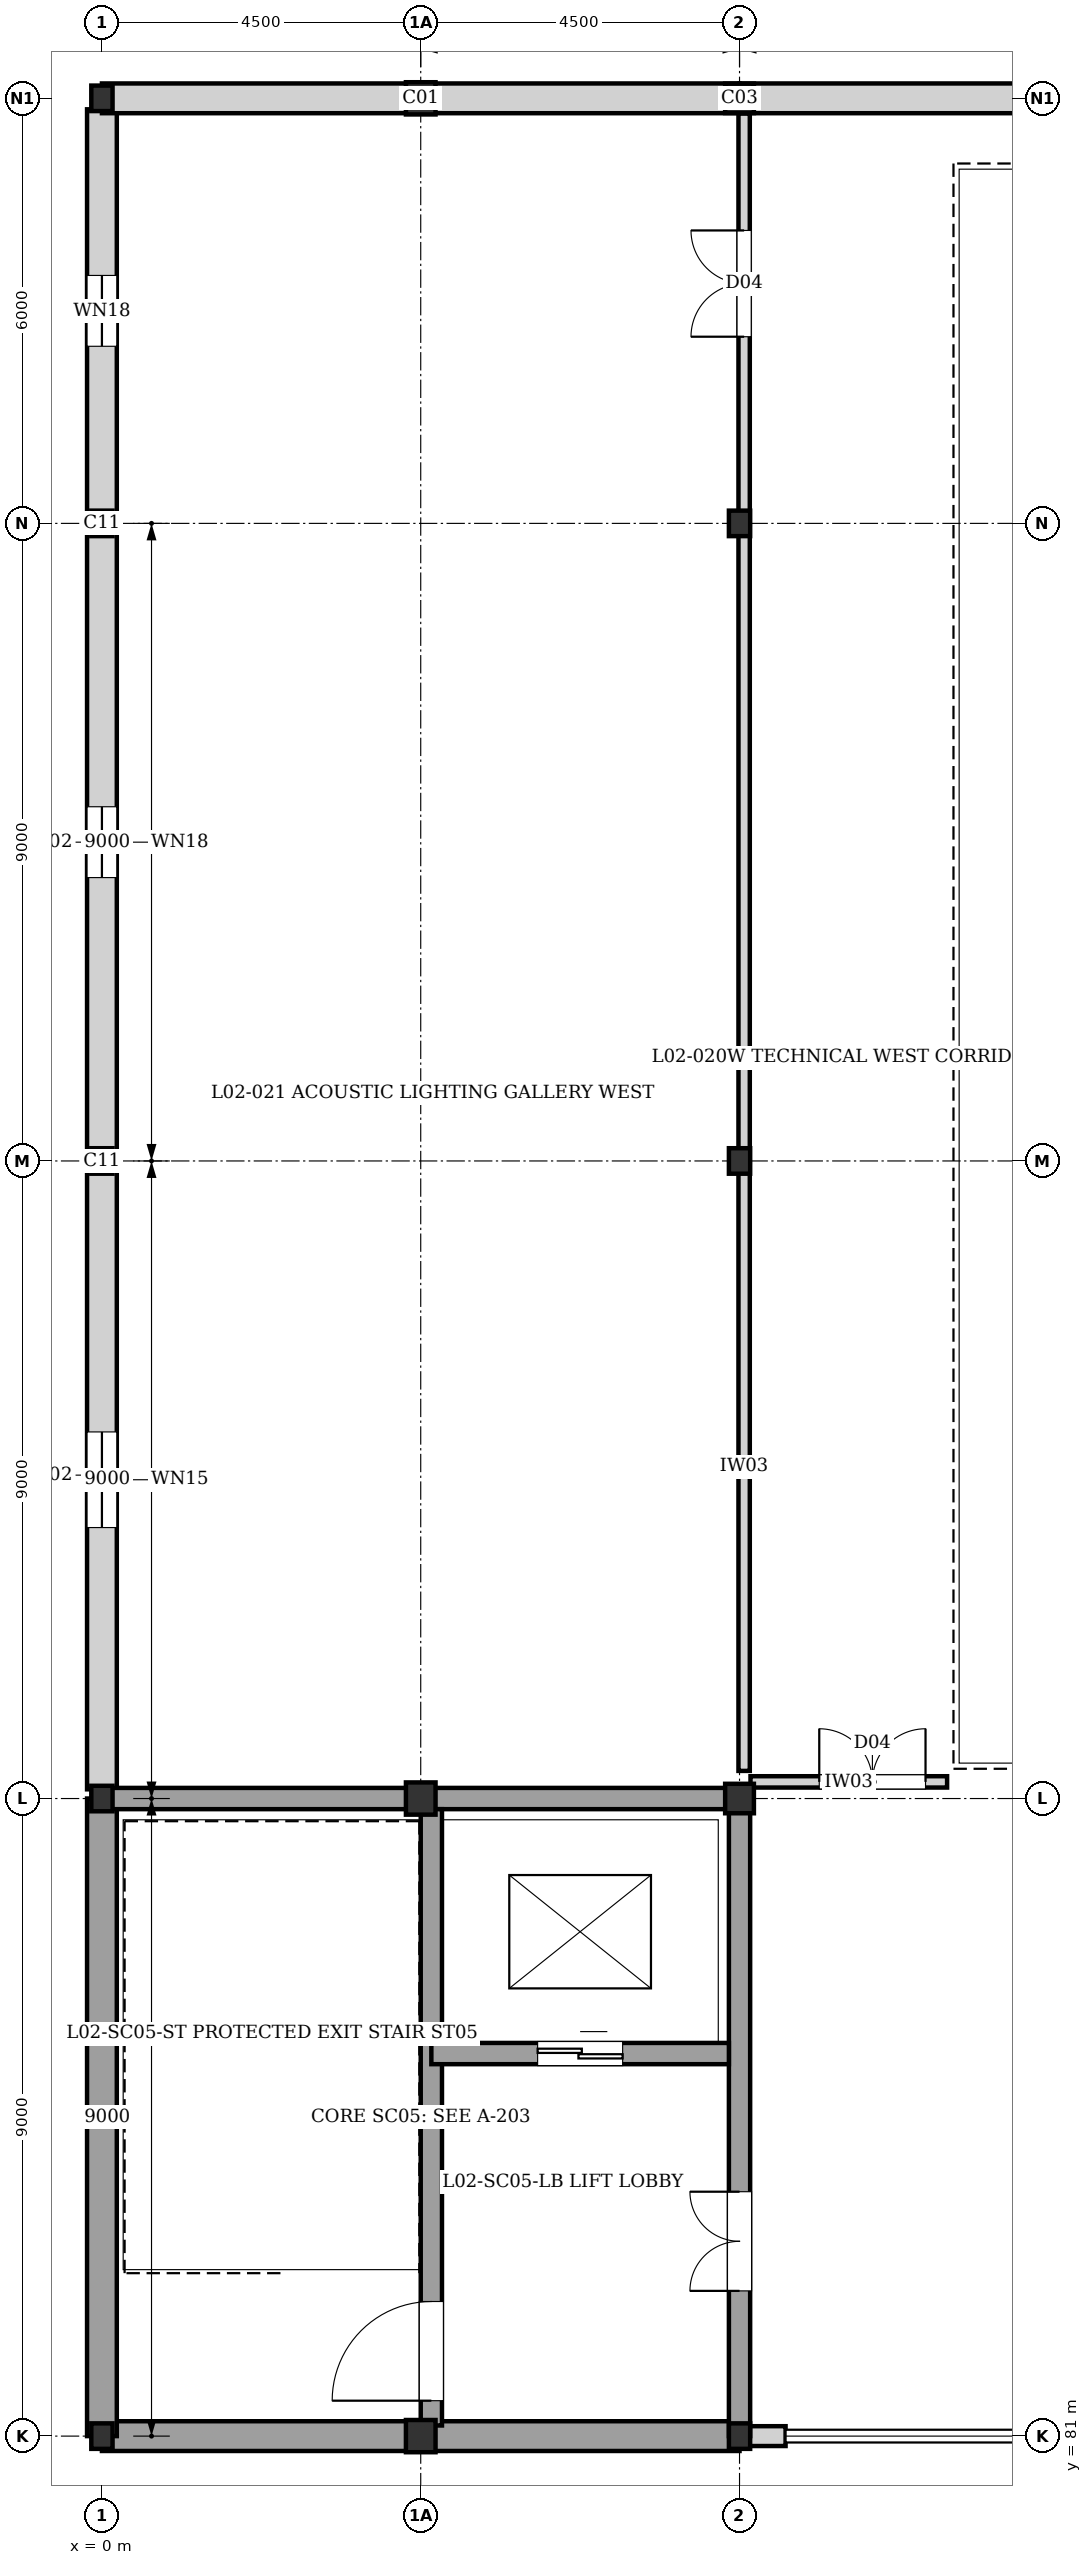
"""IFC4 building model, lengths in metres.
Left out: names, types, materials, properties, quantities, classifications, styles, units other than length and angle.
Written with IfcOpenShell. Run it as: python <this file> out.ifc"""

import sys

from ifc_helpers import new_model, si_unit, direction, frame, frame_2d, origin, origin_2d, place, context, subcontext, project, spatial, rectangle, i_section, extrude, element, fill, save


model = new_model("IFC4")
c1 = context("Model", 3, precision=1e-05, world=origin(), true_north=direction((0.0, 1.0)))
c2 = subcontext(c1, "Body", "Model", "MODEL_VIEW")
j1 = project(units=[si_unit("LENGTHUNIT", "METRE"), si_unit("PLANEANGLEUNIT", "RADIAN")], contexts=[c1])
p1 = place(None, origin())
s1 = spatial("IfcSite", under=j1, at=p1, CompositionType="ELEMENT")
p2 = place(p1, origin())
s2 = spatial("IfcBuilding", under=s1, at=p2, CompositionType="ELEMENT")
p3 = place(p2, frame((0.0, 0.0, 8.16)))
s3 = spatial("IfcBuildingStorey", under=s2, at=p3, CompositionType="ELEMENT", Elevation=8.16)
for number, where, z_axis, x_axis in (
    (1, (0.0, 81.0, 0.0), (0.0, 0.0, 1.0), (1.0, 0.0, 0.0)),
    (2, (0.0, 90.0, 0.0), (0.0, 0.0, 1.0), (1.0, 0.0, 0.0)),
    (3, (0.0, 99.0, 0.0), (0.0, 0.0, 1.0), (1.0, 0.0, 0.0)),
    (4, (0.0, 108.0, 0.0), (0.0, 0.0, 1.0), (1.0, 0.0, 0.0)),
    (5, (0.0, 114.0, 0.0), (0.0, 0.0, 1.0), (1.0, 0.0, 0.0)),
    (6, (9.0, 81.0, 0.0), (0.0, 0.0, 1.0), (1.0, 0.0, 0.0)),
):
    element("IfcColumn", number, at=place(p3, frame(where, z_axis=z_axis, x_axis=x_axis)), inside=s3, PredefinedType="COLUMN", context=c2, shape_type="SweptSolid", body=[
        extrude(i_section(OverallWidth=0.3, OverallDepth=0.36, WebThickness=0.012, FlangeThickness=0.022, at=origin_2d()), origin(), (0.0, 0.0, 1.0), 3.36),
    ])
p4 = place(p3, frame((9.0, 90.0, 0.0), z_axis=(0.0, 0.0, 1.0), x_axis=(1.0, 0.0, 0.0)))
e7 = element("IfcColumn", 7, at=p4, inside=s3, PredefinedType="COLUMN", context=c2, shape_type="SweptSolid", body=[
    extrude(i_section(OverallWidth=0.406, OverallDepth=0.416, WebThickness=0.022, FlangeThickness=0.038, at=origin_2d()), origin(), (0.0, 0.0, 1.0), 3.36),
])
for number, where, z_axis, x_axis in (
    (8, (9.0, 99.0, 0.0), (0.0, 0.0, 1.0), (1.0, 0.0, 0.0)),
    (9, (9.0, 108.0, 0.0), (0.0, 0.0, 1.0), (1.0, 0.0, 0.0)),
):
    element("IfcColumn", number, at=place(p3, frame(where, z_axis=z_axis, x_axis=x_axis)), inside=s3, PredefinedType="COLUMN", context=c2, shape_type="SweptSolid", body=[
        extrude(i_section(OverallWidth=0.3, OverallDepth=0.36, WebThickness=0.012, FlangeThickness=0.022, at=origin_2d()), origin(), (0.0, 0.0, 1.0), 3.36),
    ])
p5 = place(p3, frame((9.0, 114.0, 0.0), z_axis=(0.0, 0.0, 1.0), x_axis=(1.0, 0.0, 0.0)))
e10 = element("IfcColumn", 10, at=p5, inside=s3, PredefinedType="COLUMN", context=c2, shape_type="SweptSolid", body=[
    extrude(i_section(OverallWidth=0.406, OverallDepth=0.416, WebThickness=0.022, FlangeThickness=0.038, at=origin_2d()), origin(), (0.0, 0.0, 1.0), 3.36),
])
for number, where, z_axis, x_axis in (
    (11, (4.5, 81.0, 2.82), (0.0, 0.0, 1.0), (1.0, 0.0, 0.0)),
    (12, (4.5, 90.0, 2.82), (0.0, 0.0, 1.0), (1.0, 0.0, 0.0)),
    (13, (4.5, 114.0, 2.82), (0.0, 0.0, 1.0), (1.0, 0.0, 0.0)),
):
    element("IfcColumn", number, at=place(p3, frame(where, z_axis=z_axis, x_axis=x_axis)), inside=s3, PredefinedType="COLUMN", context=c2, shape_type="SweptSolid", body=[
        extrude(i_section(OverallWidth=0.418, OverallDepth=0.455, WebThickness=0.032, FlangeThickness=0.056, at=origin_2d()), origin(), (0.0, 0.0, 1.0), 1.005),
    ])
p6 = place(p3, frame((9.65, 81.0, 0.0), z_axis=(0.0, 0.0, 1.0), x_axis=(-1.0, 0.0, 0.0)))
e14 = element("IfcWall", 14, at=p6, inside=s3, PredefinedType="SOLIDWALL", context=c2, shape_type="SweptSolid", body=[
    extrude(rectangle(XDim=0.52, YDim=0.28, at=frame_2d((0.26, 0.0))), origin(), (0.0, 0.0, 1.0), 2.035),
])
for number, where, z_axis, x_axis in (
    (15, (9.0, 81.0, 0.0), (0.0, 0.0, 1.0), (-1.0, 0.0, 0.0)),
    (16, (0.0, 81.0, 0.0), (0.0, 0.0, 1.0), (0.0, 1.0, 0.0)),
):
    element("IfcWall", number, at=place(p3, frame(where, z_axis=z_axis, x_axis=x_axis)), inside=s3, PredefinedType="SOLIDWALL", context=c2, shape_type="SweptSolid", body=[
        extrude(rectangle(XDim=9.0, YDim=0.42, at=frame_2d((4.5, 0.0))), origin(), (0.0, 0.0, 1.0), 3.11),
    ])
p7 = place(p3, frame((0.0, 90.13, 0.0), z_axis=(0.0, 0.0, 1.0), x_axis=(0.0, 1.0, 0.0)))
e17 = element("IfcWall", 17, at=p7, inside=s3, PredefinedType="SOLIDWALL", context=c2, shape_type="SweptSolid", body=[
    extrude(rectangle(XDim=8.87, YDim=0.42, at=frame_2d((4.435, 0.0))), origin(), (0.0, 0.0, 1.0), 2.7),
])
p8 = place(p7, frame((3.695, 0.0, 0.4)))
e18 = element("IfcOpeningElement", 18, at=p8, cuts=e17, PredefinedType="OPENING", context=c2, shape_type="SweptSolid", body=[
    extrude(rectangle(XDim=1.35, YDim=1.8, at=frame_2d((0.675, 0.9))), frame((0.0, 0.22, 0.0), z_axis=(0.0, -1.0, 0.0), x_axis=(1.0, 0.0, 0.0)), (0.0, 0.0, 1.0), 0.44),
])
p9 = place(p3, frame((0.0, 99.0, 0.0), z_axis=(0.0, 0.0, 1.0), x_axis=(0.0, 1.0, 0.0)))
e19 = element("IfcWall", 19, at=p9, inside=s3, PredefinedType="SOLIDWALL", context=c2, shape_type="SweptSolid", body=[
    extrude(rectangle(XDim=9.0, YDim=0.42, at=frame_2d((4.5, 0.0))), origin(), (0.0, 0.0, 1.0), 3.11),
])
p10 = place(p9, frame((4.0, 0.0, 0.4)))
e20 = element("IfcOpeningElement", 20, at=p10, cuts=e19, PredefinedType="OPENING", context=c2, shape_type="SweptSolid", body=[
    extrude(rectangle(XDim=1.0, YDim=1.6, at=frame_2d((0.5, 0.8))), frame((0.0, 0.22, 0.0), z_axis=(0.0, -1.0, 0.0), x_axis=(1.0, 0.0, 0.0)), (0.0, 0.0, 1.0), 0.44),
])
p11 = place(p3, frame((0.0, 108.0, 0.0), z_axis=(0.0, 0.0, 1.0), x_axis=(0.0, 1.0, 0.0)))
e21 = element("IfcWall", 21, at=p11, inside=s3, PredefinedType="SOLIDWALL", context=c2, shape_type="SweptSolid", body=[
    extrude(rectangle(XDim=5.845, YDim=0.42, at=frame_2d((2.922, 0.0))), origin(), (0.0, 0.0, 1.0), 2.8),
])
p12 = place(p11, frame((2.5, 0.0, 0.4)))
e22 = element("IfcOpeningElement", 22, at=p12, cuts=e21, PredefinedType="OPENING", context=c2, shape_type="SweptSolid", body=[
    extrude(rectangle(XDim=1.0, YDim=1.6, at=frame_2d((0.5, 0.8))), frame((0.0, 0.22, 0.0), z_axis=(0.0, -1.0, 0.0), x_axis=(1.0, 0.0, 0.0)), (0.0, 0.0, 1.0), 0.44),
])
for number, where, z_axis, x_axis in (
    (23, (0.0, 114.0, 0.0), (0.0, 0.0, 1.0), (1.0, 0.0, 0.0)),
    (24, (9.0, 114.0, 0.0), (0.0, 0.0, 1.0), (1.0, 0.0, 0.0)),
):
    element("IfcWall", number, at=place(p3, frame(where, z_axis=z_axis, x_axis=x_axis)), inside=s3, PredefinedType="SOLIDWALL", context=c2, shape_type="SweptSolid", body=[
        extrude(rectangle(XDim=9.0, YDim=0.42, at=frame_2d((4.5, 0.0))), origin(), (0.0, 0.0, 1.0), 2.035),
    ])
p13 = place(p3, frame((9.0, 81.0, 0.0), z_axis=(0.0, 0.0, 1.0), x_axis=(0.0, 1.0, 0.0)))
e25 = element("IfcWall", 25, at=p13, inside=s3, PredefinedType="SHEAR", context=c2, shape_type="SweptSolid", body=[
    extrude(rectangle(XDim=9.0, YDim=0.3, at=frame_2d((4.5, 0.0))), origin(), (0.0, 0.0, 1.0), 3.11),
])
p14 = place(p13, frame((2.05, 0.0, 0.0)))
e26 = element("IfcOpeningElement", 26, at=p14, cuts=e25, PredefinedType="OPENING", context=c2, shape_type="SweptSolid", body=[
    extrude(rectangle(XDim=1.4, YDim=2.02, at=frame_2d((0.7, 1.01))), frame((0.0, 0.16, 0.0), z_axis=(0.0, -1.0, 0.0), x_axis=(1.0, 0.0, 0.0)), (0.0, 0.0, 1.0), 0.32),
])
p15 = place(p3, frame((0.0, 90.0, 0.0), z_axis=(0.0, 0.0, 1.0), x_axis=(1.0, 0.0, 0.0)))
e27 = element("IfcWall", 27, at=p15, inside=s3, PredefinedType="SHEAR", context=c2, shape_type="SweptSolid", body=[
    extrude(rectangle(XDim=9.0, YDim=0.3, at=frame_2d((4.5, 0.0))), origin(), (0.0, 0.0, 1.0), 3.11),
])
p16 = place(p3, frame((4.65, 81.15, 0.0), z_axis=(0.0, 0.0, 1.0), x_axis=(0.0, 1.0, 0.0)))
e28 = element("IfcWall", 28, at=p16, inside=s3, PredefinedType="SHEAR", context=c2, shape_type="SweptSolid", body=[
    extrude(rectangle(XDim=8.7, YDim=0.3, at=frame_2d((4.35, 0.0))), origin(), (0.0, 0.0, 1.0), 3.11),
])
p17 = place(p16, frame((0.35, 0.0, 0.0)))
e29 = element("IfcOpeningElement", 29, at=p17, cuts=e28, PredefinedType="OPENING", context=c2, shape_type="SweptSolid", body=[
    extrude(rectangle(XDim=1.4, YDim=2.02, at=frame_2d((0.7, 1.01))), frame((0.0, 0.16, 0.0), z_axis=(0.0, -1.0, 0.0), x_axis=(1.0, 0.0, 0.0)), (0.0, 0.0, 1.0), 0.32),
])
p18 = place(p3, frame((4.65, 86.4, 0.0), z_axis=(0.0, 0.0, 1.0), x_axis=(1.0, 0.0, 0.0)))
e30 = element("IfcWall", 30, at=p18, inside=s3, PredefinedType="SHEAR", context=c2, shape_type="SweptSolid", body=[
    extrude(rectangle(XDim=4.2, YDim=0.3, at=frame_2d((2.1, 0.0))), origin(), (0.0, 0.0, 1.0), 3.11),
])
p19 = place(p18, frame((1.5, 0.0, 0.0)))
e31 = element("IfcOpeningElement", 31, at=p19, cuts=e30, PredefinedType="OPENING", context=c2, shape_type="SweptSolid", body=[
    extrude(rectangle(XDim=1.2, YDim=2.2, at=frame_2d((0.6, 1.1))), frame((0.0, 0.16, 0.0), z_axis=(0.0, -1.0, 0.0), x_axis=(1.0, 0.0, 0.0)), (0.0, 0.0, 1.0), 0.32),
])
p20 = place(p3, frame((9.155, 90.235, 0.0), z_axis=(0.0, 0.0, 1.0), x_axis=(1.0, 0.0, 0.0)))
e32 = element("IfcWall", 32, at=p20, inside=s3, PredefinedType="PARTITIONING", context=c2, shape_type="SweptSolid", body=[
    extrude(rectangle(XDim=2.775, YDim=0.16, at=frame_2d((1.387, 0.0))), origin(), (0.0, 0.0, 1.0), 3.11),
])
p21 = place(p20, frame((0.97, 0.0, 0.0)))
e33 = element("IfcOpeningElement", 33, at=p21, cuts=e32, PredefinedType="OPENING", context=c2, shape_type="SweptSolid", body=[
    extrude(rectangle(XDim=1.5, YDim=2.1, at=frame_2d((0.75, 1.05))), frame((0.0, 0.09, 0.0), z_axis=(0.0, -1.0, 0.0), x_axis=(1.0, 0.0, 0.0)), (0.0, 0.0, 1.0), 0.18),
])
p22 = place(p3, frame((9.065, 90.39, 0.0), z_axis=(0.0, 0.0, 1.0), x_axis=(0.0, 1.0, 0.0)))
e34 = element("IfcWall", 34, at=p22, inside=s3, PredefinedType="PARTITIONING", context=c2, shape_type="SweptSolid", body=[
    extrude(rectangle(XDim=8.59, YDim=0.16, at=frame_2d((4.295, 0.0))), origin(), (0.0, 0.0, 1.0), 2.77),
])
p23 = place(p3, frame((9.065, 98.98, 0.0), z_axis=(0.0, 0.0, 1.0), x_axis=(0.0, 1.0, 0.0)))
e35 = element("IfcWall", 35, at=p23, inside=s3, PredefinedType="PARTITIONING", context=c2, shape_type="SweptSolid", body=[
    extrude(rectangle(XDim=9.0, YDim=0.16, at=frame_2d((4.5, 0.0))), origin(), (0.0, 0.0, 1.0), 2.71),
])
p24 = place(p3, frame((9.065, 107.98, 0.0), z_axis=(0.0, 0.0, 1.0), x_axis=(0.0, 1.0, 0.0)))
e36 = element("IfcWall", 36, at=p24, inside=s3, PredefinedType="PARTITIONING", context=c2, shape_type="SweptSolid", body=[
    extrude(rectangle(XDim=5.805, YDim=0.16, at=frame_2d((2.902, 0.0))), origin(), (0.0, 0.0, 1.0), 2.66),
])
p25 = place(p24, frame((2.655, 0.0, 0.0)))
e37 = element("IfcOpeningElement", 37, at=p25, cuts=e36, PredefinedType="OPENING", context=c2, shape_type="SweptSolid", body=[
    extrude(rectangle(XDim=1.5, YDim=2.1, at=frame_2d((0.75, 1.05))), frame((0.0, 0.09, 0.0), z_axis=(0.0, -1.0, 0.0), x_axis=(1.0, 0.0, 0.0)), (0.0, 0.0, 1.0), 0.18),
])
p26 = place(p8, origin())
e38 = element("IfcWindow", 38, at=p26, inside=s3, PartitioningType="SINGLE_PANEL", PredefinedType="WINDOW", context=c2, shape_type="SweptSolid", body=[
    extrude(rectangle(XDim=1.35, YDim=1.8, at=frame_2d((0.675, 0.9))), frame((0.0, 0.03, 0.0), z_axis=(0.0, -1.0, 0.0), x_axis=(1.0, 0.0, 0.0)), (0.0, 0.0, 1.0), 0.06),
])
fill(e18, e38)
p27 = place(p10, origin())
e39 = element("IfcWindow", 39, at=p27, inside=s3, PartitioningType="SINGLE_PANEL", PredefinedType="WINDOW", context=c2, shape_type="SweptSolid", body=[
    extrude(rectangle(XDim=1.0, YDim=1.6, at=frame_2d((0.5, 0.8))), frame((0.0, 0.03, 0.0), z_axis=(0.0, -1.0, 0.0), x_axis=(1.0, 0.0, 0.0)), (0.0, 0.0, 1.0), 0.06),
])
fill(e20, e39)
p28 = place(p12, origin())
e40 = element("IfcWindow", 40, at=p28, inside=s3, PartitioningType="SINGLE_PANEL", PredefinedType="WINDOW", context=c2, shape_type="SweptSolid", body=[
    extrude(rectangle(XDim=1.0, YDim=1.6, at=frame_2d((0.5, 0.8))), frame((0.0, 0.03, 0.0), z_axis=(0.0, -1.0, 0.0), x_axis=(1.0, 0.0, 0.0)), (0.0, 0.0, 1.0), 0.06),
])
fill(e22, e40)
p29 = place(p14, origin())
e41 = element("IfcDoor", 41, at=p29, inside=s3, OperationType="DOUBLE_DOOR_SINGLE_SWING", PredefinedType="DOOR", context=c2, shape_type="SweptSolid", body=[
    extrude(rectangle(XDim=1.4, YDim=2.02, at=frame_2d((0.7, 1.01))), frame((0.0, 0.025, 0.0), z_axis=(0.0, -1.0, 0.0), x_axis=(1.0, 0.0, 0.0)), (0.0, 0.0, 1.0), 0.05),
])
fill(e26, e41)
p30 = place(p17, origin())
e42 = element("IfcDoor", 42, at=p30, inside=s3, OperationType="SINGLE_SWING_LEFT", PredefinedType="DOOR", context=c2, shape_type="SweptSolid", body=[
    extrude(rectangle(XDim=1.4, YDim=2.02, at=frame_2d((0.7, 1.01))), frame((0.0, 0.025, 0.0), z_axis=(0.0, -1.0, 0.0), x_axis=(1.0, 0.0, 0.0)), (0.0, 0.0, 1.0), 0.05),
])
fill(e29, e42)
p31 = place(p19, origin())
e43 = element("IfcDoor", 43, at=p31, inside=s3, OperationType="DOUBLE_DOOR_SLIDING", PredefinedType="DOOR", context=c2, shape_type="SweptSolid", body=[
    extrude(rectangle(XDim=1.2, YDim=2.2, at=frame_2d((0.6, 1.1))), frame((0.0, 0.025, 0.0), z_axis=(0.0, -1.0, 0.0), x_axis=(1.0, 0.0, 0.0)), (0.0, 0.0, 1.0), 0.05),
])
fill(e31, e43)
p32 = place(p21, origin())
e44 = element("IfcDoor", 44, at=p32, inside=s3, OperationType="DOUBLE_DOOR_SINGLE_SWING", PredefinedType="DOOR", context=c2, shape_type="SweptSolid", body=[
    extrude(rectangle(XDim=1.5, YDim=2.1, at=frame_2d((0.75, 1.05))), frame((0.0, 0.025, 0.0), z_axis=(0.0, -1.0, 0.0), x_axis=(1.0, 0.0, 0.0)), (0.0, 0.0, 1.0), 0.05),
])
fill(e33, e44)
p33 = place(p25, origin())
e45 = element("IfcDoor", 45, at=p33, inside=s3, OperationType="DOUBLE_DOOR_SINGLE_SWING", PredefinedType="DOOR", context=c2, shape_type="SweptSolid", body=[
    extrude(rectangle(XDim=1.5, YDim=2.1, at=frame_2d((0.75, 1.05))), frame((0.0, 0.025, 0.0), z_axis=(0.0, -1.0, 0.0), x_axis=(1.0, 0.0, 0.0)), (0.0, 0.0, 1.0), 0.05),
])
fill(e37, e45)
save(model, sys.argv[1])
